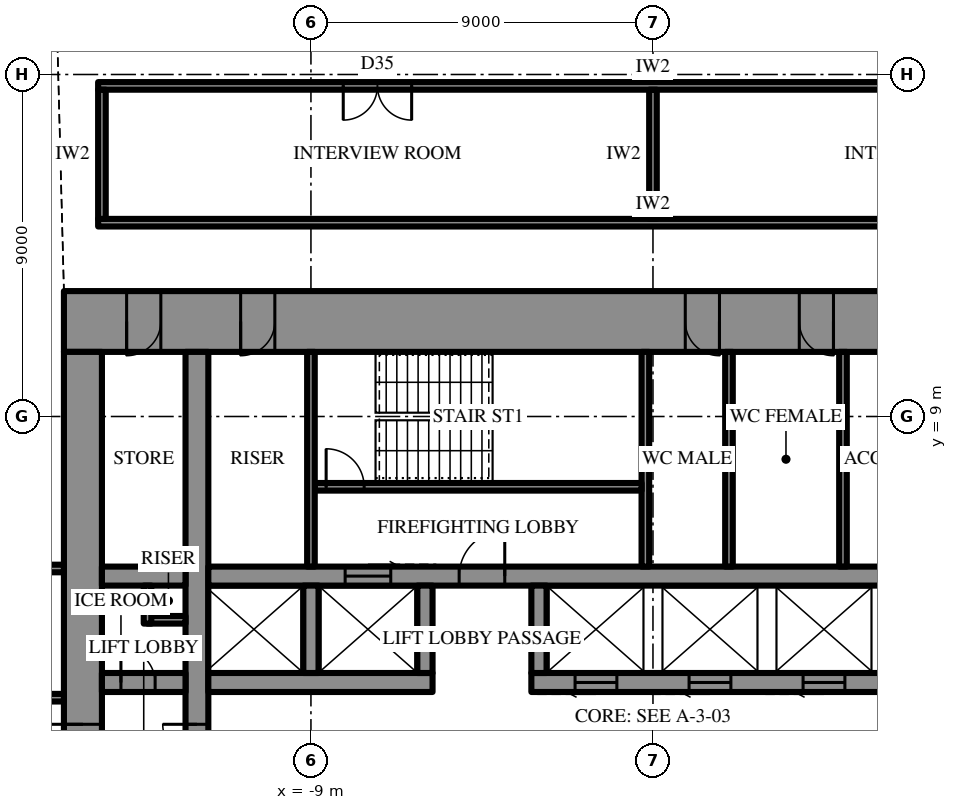
"""IFC4 building model, lengths in metres.
Left out: names, types, materials, properties, quantities, classifications, styles, units other than length and angle.
Written with IfcOpenShell. Run it as: python <this file> out.ifc"""

import sys

from ifc_helpers import new_model, si_unit, direction, frame, frame_2d, origin, place, context, subcontext, project, spatial, rectangle, extrude, element, fill, save


model = new_model("IFC4")
c1 = context("Model", 3, precision=1e-05, world=origin(), true_north=direction((0.0, 1.0)))
c2 = subcontext(c1, "Body", "Model", "MODEL_VIEW")
j1 = project(units=[si_unit("LENGTHUNIT", "METRE"), si_unit("PLANEANGLEUNIT", "RADIAN")], contexts=[c1])
p1 = place(None, origin())
s1 = spatial("IfcSite", under=j1, at=p1, CompositionType="ELEMENT")
p2 = place(p1, origin())
s2 = spatial("IfcBuilding", under=s1, at=p2, CompositionType="ELEMENT")
p3 = place(p2, frame((0.0, 0.0, 232.3)))
s3 = spatial("IfcBuildingStorey", under=s2, at=p3, CompositionType="ELEMENT", Elevation=232.3)
p4 = place(p3, frame((-15.5, 11.5, 0.0), z_axis=(0.0, 0.0, 1.0), x_axis=(1.0, 0.0, 0.0)))
e1 = element("IfcWall", 1, at=p4, inside=s3, PredefinedType="SHEAR", context=c2, shape_type="SweptSolid", body=[
    extrude(rectangle(XDim=31.0, YDim=1.6, at=frame_2d((15.5, 0.0))), origin(), (0.0, 0.0, 1.0), 4.2),
])
p5 = place(p4, frame((16.35, 0.0, 0.0)))
e2 = element("IfcOpeningElement", 2, at=p5, cuts=e1, PredefinedType="OPENING", context=c2, shape_type="SweptSolid", body=[
    extrude(rectangle(XDim=0.9, YDim=2.2, at=frame_2d((0.45, 1.1))), frame((0.0, 0.81, 0.0), z_axis=(0.0, -1.0, 0.0), x_axis=(1.0, 0.0, 0.0)), (0.0, 0.0, 1.0), 1.62),
])
p6 = place(p4, frame((19.35, 0.0, 0.0)))
e3 = element("IfcOpeningElement", 3, at=p6, cuts=e1, PredefinedType="OPENING", context=c2, shape_type="SweptSolid", body=[
    extrude(rectangle(XDim=0.9, YDim=2.2, at=frame_2d((0.45, 1.1))), frame((0.0, 0.81, 0.0), z_axis=(0.0, -1.0, 0.0), x_axis=(1.0, 0.0, 0.0)), (0.0, 0.0, 1.0), 1.62),
])
p7 = place(p4, frame((22.4, 0.0, 0.0)))
e4 = element("IfcOpeningElement", 4, at=p7, cuts=e1, PredefinedType="OPENING", context=c2, shape_type="SweptSolid", body=[
    extrude(rectangle(XDim=1.0, YDim=2.2, at=frame_2d((0.5, 1.1))), frame((0.0, 0.81, 0.0), z_axis=(0.0, -1.0, 0.0), x_axis=(1.0, 0.0, 0.0)), (0.0, 0.0, 1.0), 1.62),
])
p8 = place(p4, frame((1.65, 0.0, 0.0)))
e5 = element("IfcOpeningElement", 5, at=p8, cuts=e1, PredefinedType="OPENING", context=c2, shape_type="SweptSolid", body=[
    extrude(rectangle(XDim=0.9, YDim=2.2, at=frame_2d((0.45, 1.1))), frame((0.0, 0.81, 0.0), z_axis=(0.0, -1.0, 0.0), x_axis=(1.0, 0.0, 0.0)), (0.0, 0.0, 1.0), 1.62),
])
p9 = place(p4, frame((4.65, 0.0, 0.0)))
e6 = element("IfcOpeningElement", 6, at=p9, cuts=e1, PredefinedType="OPENING", context=c2, shape_type="SweptSolid", body=[
    extrude(rectangle(XDim=0.9, YDim=2.2, at=frame_2d((0.45, 1.1))), frame((0.0, 0.81, 0.0), z_axis=(0.0, -1.0, 0.0), x_axis=(1.0, 0.0, 0.0)), (0.0, 0.0, 1.0), 1.62),
])
p10 = place(p4, frame((25.45, 0.0, 0.0)))
e7 = element("IfcOpeningElement", 7, at=p10, cuts=e1, PredefinedType="OPENING", context=c2, shape_type="SweptSolid", body=[
    extrude(rectangle(XDim=0.9, YDim=2.2, at=frame_2d((0.45, 1.1))), frame((0.0, 0.81, 0.0), z_axis=(0.0, -1.0, 0.0), x_axis=(1.0, 0.0, 0.0)), (0.0, 0.0, 1.0), 1.62),
])
p11 = place(p4, frame((28.45, 0.0, 0.0)))
e8 = element("IfcOpeningElement", 8, at=p11, cuts=e1, PredefinedType="OPENING", context=c2, shape_type="SweptSolid", body=[
    extrude(rectangle(XDim=0.9, YDim=2.2, at=frame_2d((0.45, 1.1))), frame((0.0, 0.81, 0.0), z_axis=(0.0, -1.0, 0.0), x_axis=(1.0, 0.0, 0.0)), (0.0, 0.0, 1.0), 1.62),
])
p12 = place(p3, frame((-15.0, 10.7, 0.0), z_axis=(0.0, 0.0, 1.0), x_axis=(0.0, -1.0, 0.0)))
e9 = element("IfcWall", 9, at=p12, inside=s3, PredefinedType="SHEAR", context=c2, shape_type="SweptSolid", body=[
    extrude(rectangle(XDim=21.4, YDim=1.0, at=frame_2d((10.7, 0.0))), origin(), (0.0, 0.0, 1.0), 4.2),
])
p13 = place(p12, frame((9.8, 0.0, 0.0)))
e10 = element("IfcOpeningElement", 10, at=p13, cuts=e9, PredefinedType="OPENING", context=c2, shape_type="SweptSolid", body=[
    extrude(rectangle(XDim=1.8, YDim=2.4, at=frame_2d((0.9, 1.2))), frame((0.0, 0.51, 0.0), z_axis=(0.0, -1.0, 0.0), x_axis=(1.0, 0.0, 0.0)), (0.0, 0.0, 1.0), 1.02),
])
p14 = place(p3, frame((-12.0, -10.7, 0.0), z_axis=(0.0, 0.0, 1.0), x_axis=(0.0, 1.0, 0.0)))
e11 = element("IfcWall", 11, at=p14, inside=s3, PredefinedType="SHEAR", context=c2, shape_type="SweptSolid", body=[
    extrude(rectangle(XDim=21.4, YDim=0.6, at=frame_2d((10.7, 0.0))), origin(), (0.0, 0.0, 1.0), 4.2),
])
p15 = place(p14, frame((9.8, 0.0, 0.0)))
e12 = element("IfcOpeningElement", 12, at=p15, cuts=e11, PredefinedType="OPENING", context=c2, shape_type="SweptSolid", body=[
    extrude(rectangle(XDim=1.8, YDim=2.4, at=frame_2d((0.9, 1.2))), frame((0.0, 0.31, 0.0), z_axis=(0.0, -1.0, 0.0), x_axis=(1.0, 0.0, 0.0)), (0.0, 0.0, 1.0), 0.62),
])
p16 = place(p3, frame((-14.5, 2.0, 0.0), z_axis=(0.0, 0.0, 1.0), x_axis=(1.0, 0.0, 0.0)))
e13 = element("IfcWall", 13, at=p16, inside=s3, PredefinedType="SHEAR", context=c2, shape_type="SweptSolid", body=[
    extrude(rectangle(XDim=2.2, YDim=0.5, at=frame_2d((1.1, 0.0))), origin(), (0.0, 0.0, 1.0), 4.2),
])
p17 = place(p16, frame((0.5, 0.0, 0.0)))
e14 = element("IfcOpeningElement", 14, at=p17, cuts=e13, PredefinedType="OPENING", context=c2, shape_type="SweptSolid", body=[
    extrude(rectangle(XDim=0.9, YDim=2.2, at=frame_2d((0.45, 1.1))), frame((0.0, 0.26, 0.0), z_axis=(0.0, -1.0, 0.0), x_axis=(1.0, 0.0, 0.0)), (0.0, 0.0, 1.0), 0.52),
])
p18 = place(p3, frame((-11.7, 2.0, 0.0), z_axis=(0.0, 0.0, 1.0), x_axis=(1.0, 0.0, 0.0)))
e15 = element("IfcWall", 15, at=p18, inside=s3, PredefinedType="SHEAR", context=c2, shape_type="SweptSolid", body=[
    extrude(rectangle(XDim=5.9, YDim=0.5, at=frame_2d((2.95, 0.0))), origin(), (0.0, 0.0, 1.0), 4.2),
])
p19 = place(p3, frame((-3.2, 2.0, 0.0), z_axis=(0.0, 0.0, 1.0), x_axis=(1.0, 0.0, 0.0)))
e16 = element("IfcWall", 16, at=p19, inside=s3, PredefinedType="SHEAR", context=c2, shape_type="SweptSolid", body=[
    extrude(rectangle(XDim=14.9, YDim=0.5, at=frame_2d((7.45, 0.0))), origin(), (0.0, 0.0, 1.0), 4.2),
])
p20 = place(p19, frame((1.15, 0.0, 0.0)))
e17 = element("IfcOpeningElement", 17, at=p20, cuts=e16, PredefinedType="OPENING", context=c2, shape_type="SweptSolid", body=[
    extrude(rectangle(XDim=1.1, YDim=2.2, at=frame_2d((0.55, 1.1))), frame((0.0, 0.26, 0.0), z_axis=(0.0, -1.0, 0.0), x_axis=(1.0, 0.0, 0.0)), (0.0, 0.0, 1.0), 0.52),
])
p21 = place(p19, frame((4.15, 0.0, 0.0)))
e18 = element("IfcOpeningElement", 18, at=p21, cuts=e16, PredefinedType="OPENING", context=c2, shape_type="SweptSolid", body=[
    extrude(rectangle(XDim=1.1, YDim=2.2, at=frame_2d((0.55, 1.1))), frame((0.0, 0.26, 0.0), z_axis=(0.0, -1.0, 0.0), x_axis=(1.0, 0.0, 0.0)), (0.0, 0.0, 1.0), 0.52),
])
p22 = place(p19, frame((7.15, 0.0, 0.0)))
e19 = element("IfcOpeningElement", 19, at=p22, cuts=e16, PredefinedType="OPENING", context=c2, shape_type="SweptSolid", body=[
    extrude(rectangle(XDim=1.1, YDim=2.2, at=frame_2d((0.55, 1.1))), frame((0.0, 0.26, 0.0), z_axis=(0.0, -1.0, 0.0), x_axis=(1.0, 0.0, 0.0)), (0.0, 0.0, 1.0), 0.52),
])
p23 = place(p19, frame((10.15, 0.0, 0.0)))
e20 = element("IfcOpeningElement", 20, at=p23, cuts=e16, PredefinedType="OPENING", context=c2, shape_type="SweptSolid", body=[
    extrude(rectangle(XDim=1.1, YDim=2.2, at=frame_2d((0.55, 1.1))), frame((0.0, 0.26, 0.0), z_axis=(0.0, -1.0, 0.0), x_axis=(1.0, 0.0, 0.0)), (0.0, 0.0, 1.0), 0.52),
])
p24 = place(p3, frame((-14.5, 4.8, 0.0), z_axis=(0.0, 0.0, 1.0), x_axis=(1.0, 0.0, 0.0)))
e21 = element("IfcWall", 21, at=p24, inside=s3, PredefinedType="SHEAR", context=c2, shape_type="SweptSolid", body=[
    extrude(rectangle(XDim=2.2, YDim=0.5, at=frame_2d((1.1, 0.0))), origin(), (0.0, 0.0, 1.0), 4.2),
])
p25 = place(p3, frame((-11.7, 4.8, 0.0), z_axis=(0.0, 0.0, 1.0), x_axis=(1.0, 0.0, 0.0)))
e22 = element("IfcWall", 22, at=p25, inside=s3, PredefinedType="SHEAR", context=c2, shape_type="SweptSolid", body=[
    extrude(rectangle(XDim=23.4, YDim=0.5, at=frame_2d((11.7, 0.0))), origin(), (0.0, 0.0, 1.0), 4.2),
])
p26 = place(p25, frame((6.6, 0.0, 0.0)))
e23 = element("IfcOpeningElement", 23, at=p26, cuts=e22, PredefinedType="OPENING", context=c2, shape_type="SweptSolid", body=[
    extrude(rectangle(XDim=1.2, YDim=2.2, at=frame_2d((0.6, 1.1))), frame((0.0, 0.26, 0.0), z_axis=(0.0, -1.0, 0.0), x_axis=(1.0, 0.0, 0.0)), (0.0, 0.0, 1.0), 0.52),
])
p27 = place(p25, frame((3.6, 0.0, 0.0)))
e24 = element("IfcOpeningElement", 24, at=p27, cuts=e22, PredefinedType="OPENING", context=c2, shape_type="SweptSolid", body=[
    extrude(rectangle(XDim=1.2, YDim=2.2, at=frame_2d((0.6, 1.1))), frame((0.0, 0.26, 0.0), z_axis=(0.0, -1.0, 0.0), x_axis=(1.0, 0.0, 0.0)), (0.0, 0.0, 1.0), 0.52),
])
for number, where, z_axis, x_axis in (
    (25, (-9.0, 2.25, 0.0), (0.0, 0.0, 1.0), (0.0, 1.0, 0.0)),
    (26, (-6.0, 2.25, 0.0), (0.0, 0.0, 1.0), (0.0, 1.0, 0.0)),
    (27, (-3.0, 2.25, 0.0), (0.0, 0.0, 1.0), (0.0, 1.0, 0.0)),
):
    element("IfcWall", number, at=place(p3, frame(where, z_axis=z_axis, x_axis=x_axis)), inside=s3, PredefinedType="SHEAR", context=c2, shape_type="SweptSolid", body=[
        extrude(rectangle(XDim=2.3, YDim=0.4, at=frame_2d((1.15, 0.0))), origin(), (0.0, 0.0, 1.0), 4.2),
    ])
p28 = place(p3, frame((-0.2, 5.05, 0.0), z_axis=(0.0, 0.0, 1.0), x_axis=(0.0, 1.0, 0.0)))
e28 = element("IfcWall", 28, at=p28, inside=s3, PredefinedType="SHEAR", context=c2, shape_type="SweptSolid", body=[
    extrude(rectangle(XDim=5.65, YDim=0.2, at=frame_2d((2.825, 0.0))), origin(), (0.0, 0.0, 1.0), 4.2),
])
p29 = place(p3, frame((-8.9, 7.15, 0.0), z_axis=(0.0, 0.0, 1.0), x_axis=(1.0, 0.0, 0.0)))
e29 = element("IfcWall", 29, at=p29, inside=s3, PredefinedType="SHEAR", context=c2, shape_type="SweptSolid", body=[
    extrude(rectangle(XDim=8.6, YDim=0.2, at=frame_2d((4.3, 0.0))), origin(), (0.0, 0.0, 1.0), 4.2),
])
p30 = place(p29, frame((0.3, 0.0, 0.0)))
e30 = element("IfcOpeningElement", 30, at=p30, cuts=e29, PredefinedType="OPENING", context=c2, shape_type="SweptSolid", body=[
    extrude(rectangle(XDim=1.0, YDim=2.2, at=frame_2d((0.5, 1.1))), frame((0.0, 0.11, 0.0), z_axis=(0.0, -1.0, 0.0), x_axis=(1.0, 0.0, 0.0)), (0.0, 0.0, 1.0), 0.22),
])
for number, where, z_axis, x_axis in (
    (31, (-9.0, 5.05, 0.0), (0.0, 0.0, 1.0), (0.0, 1.0, 0.0)),
    (32, (2.0, 5.05, 0.0), (0.0, 0.0, 1.0), (0.0, 1.0, 0.0)),
    (33, (5.0, 5.05, 0.0), (0.0, 0.0, 1.0), (0.0, 1.0, 0.0)),
):
    element("IfcWall", number, at=place(p3, frame(where, z_axis=z_axis, x_axis=x_axis)), inside=s3, PredefinedType="PARTITIONING", context=c2, shape_type="SweptSolid", body=[
        extrude(rectangle(XDim=5.65, YDim=0.2, at=frame_2d((2.825, 0.0))), origin(), (0.0, 0.0, 1.0), 4.0),
    ])
for number, where, z_axis, x_axis in (
    (34, (-13.3, 3.65, 0.0), (0.0, 0.0, 1.0), (1.0, 0.0, 0.0)),
    (35, (-13.3, 3.55, 0.0), (0.0, 0.0, 1.0), (0.0, 1.0, 0.0)),
):
    element("IfcWall", number, at=place(p3, frame(where, z_axis=z_axis, x_axis=x_axis)), inside=s3, PredefinedType="PARTITIONING", context=c2, shape_type="SweptSolid", body=[
        extrude(rectangle(XDim=1.0, YDim=0.2, at=frame_2d((0.5, 0.0))), origin(), (0.0, 0.0, 1.0), 4.0),
    ])
p31 = place(p3, frame((-14.6, 14.1, 0.0), z_axis=(0.0, 0.0, 1.0), x_axis=(1.0, 0.0, 0.0)))
e36 = element("IfcWall", 36, at=p31, inside=s3, PredefinedType="PARTITIONING", context=c2, shape_type="SweptSolid", body=[
    extrude(rectangle(XDim=29.2, YDim=0.2, at=frame_2d((14.6, 0.0))), origin(), (0.0, 0.0, 1.0), 4.0),
])
p32 = place(p3, frame((-14.6, 17.7, 0.0), z_axis=(0.0, 0.0, 1.0), x_axis=(1.0, 0.0, 0.0)))
e37 = element("IfcWall", 37, at=p32, inside=s3, PredefinedType="PARTITIONING", context=c2, shape_type="SweptSolid", body=[
    extrude(rectangle(XDim=29.2, YDim=0.2, at=frame_2d((14.6, 0.0))), origin(), (0.0, 0.0, 1.0), 4.0),
])
p33 = place(p32, frame((6.45, 0.0, 0.0)))
e38 = element("IfcOpeningElement", 38, at=p33, cuts=e37, PredefinedType="OPENING", context=c2, shape_type="SweptSolid", body=[
    extrude(rectangle(XDim=1.8, YDim=2.4, at=frame_2d((0.9, 1.2))), frame((0.0, 0.11, 0.0), z_axis=(0.0, -1.0, 0.0), x_axis=(1.0, 0.0, 0.0)), (0.0, 0.0, 1.0), 0.22),
])
p34 = place(p32, frame((20.95, 0.0, 0.0)))
e39 = element("IfcOpeningElement", 39, at=p34, cuts=e37, PredefinedType="OPENING", context=c2, shape_type="SweptSolid", body=[
    extrude(rectangle(XDim=1.8, YDim=2.4, at=frame_2d((0.9, 1.2))), frame((0.0, 0.11, 0.0), z_axis=(0.0, -1.0, 0.0), x_axis=(1.0, 0.0, 0.0)), (0.0, 0.0, 1.0), 0.22),
])
p35 = place(p3, frame((-14.5, 14.2, 0.0), z_axis=(0.0, 0.0, 1.0), x_axis=(0.0, 1.0, 0.0)))
e40 = element("IfcWall", 40, at=p35, inside=s3, PredefinedType="PARTITIONING", context=c2, shape_type="SweptSolid", body=[
    extrude(rectangle(XDim=3.4, YDim=0.2, at=frame_2d((1.7, 0.0))), origin(), (0.0, 0.0, 1.0), 4.0),
])
p36 = place(p3, frame((0.0, 14.2, 0.0), z_axis=(0.0, 0.0, 1.0), x_axis=(0.0, 1.0, 0.0)))
e41 = element("IfcWall", 41, at=p36, inside=s3, PredefinedType="PARTITIONING", context=c2, shape_type="SweptSolid", body=[
    extrude(rectangle(XDim=3.4, YDim=0.2, at=frame_2d((1.7, 0.0))), origin(), (0.0, 0.0, 1.0), 2.992),
])
p37 = place(p3, frame((-15.5, 1.6, 0.0), z_axis=(0.0, 0.0, 1.0), x_axis=(-1.0, 0.0, 0.0)))
e42 = element("IfcWall", 42, at=p37, inside=s3, PredefinedType="PARTITIONING", context=c2, shape_type="SweptSolid", body=[
    extrude(rectangle(XDim=9.7, YDim=0.2, at=frame_2d((4.85, 0.0))), origin(), (0.0, 0.0, 1.0), 4.0),
])
p38 = place(p37, frame((6.29, 0.0, 0.0)))
e43 = element("IfcOpeningElement", 43, at=p38, cuts=e42, PredefinedType="OPENING", context=c2, shape_type="SweptSolid", body=[
    extrude(rectangle(XDim=1.0, YDim=2.2, at=frame_2d((0.5, 1.1))), frame((0.0, 0.11, 0.0), z_axis=(0.0, -1.0, 0.0), x_axis=(1.0, 0.0, 0.0)), (0.0, 0.0, 1.0), 0.22),
])
p39 = place(p3, frame((-15.5, 5.0, 0.0), z_axis=(0.0, 0.0, 1.0), x_axis=(-1.0, 0.0, 0.0)))
e44 = element("IfcWall", 44, at=p39, inside=s3, PredefinedType="PARTITIONING", context=c2, shape_type="SweptSolid", body=[
    extrude(rectangle(XDim=14.845, YDim=0.2, at=frame_2d((7.423, 0.0))), origin(), (0.0, 0.0, 1.0), 4.0),
])
p40 = place(p13, frame((1.8, 0.0, 0.0), z_axis=(0.0, 0.0, 1.0), x_axis=(-1.0, 0.0, 0.0)))
e45 = element("IfcDoor", 45, at=p40, inside=s3, OperationType="DOUBLE_DOOR_SINGLE_SWING", PredefinedType="DOOR", context=c2, shape_type="SweptSolid", body=[
    extrude(rectangle(XDim=1.8, YDim=2.4, at=frame_2d((0.9, 1.2))), frame((0.0, 0.025, 0.0), z_axis=(0.0, -1.0, 0.0), x_axis=(1.0, 0.0, 0.0)), (0.0, 0.0, 1.0), 0.05),
])
fill(e10, e45)
p41 = place(p26, origin())
e46 = element("IfcDoor", 46, at=p41, inside=s3, OperationType="SINGLE_SWING_LEFT", PredefinedType="DOOR", context=c2, shape_type="SweptSolid", body=[
    extrude(rectangle(XDim=1.2, YDim=2.2, at=frame_2d((0.6, 1.1))), frame((0.0, 0.025, 0.0), z_axis=(0.0, -1.0, 0.0), x_axis=(1.0, 0.0, 0.0)), (0.0, 0.0, 1.0), 0.05),
])
fill(e23, e46)
p42 = place(p30, origin())
e47 = element("IfcDoor", 47, at=p42, inside=s3, OperationType="SINGLE_SWING_RIGHT", PredefinedType="DOOR", context=c2, shape_type="SweptSolid", body=[
    extrude(rectangle(XDim=1.0, YDim=2.2, at=frame_2d((0.5, 1.1))), frame((0.0, 0.025, 0.0), z_axis=(0.0, -1.0, 0.0), x_axis=(1.0, 0.0, 0.0)), (0.0, 0.0, 1.0), 0.05),
])
fill(e30, e47)
p43 = place(p5, frame((0.9, 0.0, 0.0), z_axis=(0.0, 0.0, 1.0), x_axis=(-1.0, 0.0, 0.0)))
e48 = element("IfcDoor", 48, at=p43, inside=s3, OperationType="SINGLE_SWING_RIGHT", PredefinedType="DOOR", context=c2, shape_type="SweptSolid", body=[
    extrude(rectangle(XDim=0.9, YDim=2.2, at=frame_2d((0.45, 1.1))), frame((0.0, 0.025, 0.0), z_axis=(0.0, -1.0, 0.0), x_axis=(1.0, 0.0, 0.0)), (0.0, 0.0, 1.0), 0.05),
])
fill(e2, e48)
p44 = place(p6, frame((0.9, 0.0, 0.0), z_axis=(0.0, 0.0, 1.0), x_axis=(-1.0, 0.0, 0.0)))
e49 = element("IfcDoor", 49, at=p44, inside=s3, OperationType="SINGLE_SWING_RIGHT", PredefinedType="DOOR", context=c2, shape_type="SweptSolid", body=[
    extrude(rectangle(XDim=0.9, YDim=2.2, at=frame_2d((0.45, 1.1))), frame((0.0, 0.025, 0.0), z_axis=(0.0, -1.0, 0.0), x_axis=(1.0, 0.0, 0.0)), (0.0, 0.0, 1.0), 0.05),
])
fill(e3, e49)
p45 = place(p8, frame((0.9, 0.0, 0.0), z_axis=(0.0, 0.0, 1.0), x_axis=(-1.0, 0.0, 0.0)))
e50 = element("IfcDoor", 50, at=p45, inside=s3, OperationType="SINGLE_SWING_LEFT", PredefinedType="DOOR", context=c2, shape_type="SweptSolid", body=[
    extrude(rectangle(XDim=0.9, YDim=2.2, at=frame_2d((0.45, 1.1))), frame((0.0, 0.025, 0.0), z_axis=(0.0, -1.0, 0.0), x_axis=(1.0, 0.0, 0.0)), (0.0, 0.0, 1.0), 0.05),
])
fill(e5, e50)
p46 = place(p9, frame((0.9, 0.0, 0.0), z_axis=(0.0, 0.0, 1.0), x_axis=(-1.0, 0.0, 0.0)))
e51 = element("IfcDoor", 51, at=p46, inside=s3, OperationType="SINGLE_SWING_LEFT", PredefinedType="DOOR", context=c2, shape_type="SweptSolid", body=[
    extrude(rectangle(XDim=0.9, YDim=2.2, at=frame_2d((0.45, 1.1))), frame((0.0, 0.025, 0.0), z_axis=(0.0, -1.0, 0.0), x_axis=(1.0, 0.0, 0.0)), (0.0, 0.0, 1.0), 0.05),
])
fill(e6, e51)
p47 = place(p17, origin())
e52 = element("IfcDoor", 52, at=p47, inside=s3, OperationType="SINGLE_SWING_RIGHT", PredefinedType="DOOR", context=c2, shape_type="SweptSolid", body=[
    extrude(rectangle(XDim=0.9, YDim=2.2, at=frame_2d((0.45, 1.1))), frame((0.0, 0.025, 0.0), z_axis=(0.0, -1.0, 0.0), x_axis=(1.0, 0.0, 0.0)), (0.0, 0.0, 1.0), 0.05),
])
fill(e14, e52)
p48 = place(p15, origin())
e53 = element("IfcDoor", 53, at=p48, inside=s3, OperationType="DOUBLE_DOOR_SINGLE_SWING", PredefinedType="DOOR", context=c2, shape_type="SweptSolid", body=[
    extrude(rectangle(XDim=1.8, YDim=2.4, at=frame_2d((0.9, 1.2))), frame((0.0, 0.025, 0.0), z_axis=(0.0, -1.0, 0.0), x_axis=(1.0, 0.0, 0.0)), (0.0, 0.0, 1.0), 0.05),
])
fill(e12, e53)
p49 = place(p27, origin())
e54 = element("IfcDoor", 54, at=p49, inside=s3, OperationType="SLIDING_TO_LEFT", PredefinedType="DOOR", context=c2, shape_type="SweptSolid", body=[
    extrude(rectangle(XDim=1.2, YDim=2.2, at=frame_2d((0.6, 1.1))), frame((0.0, 0.025, 0.0), z_axis=(0.0, -1.0, 0.0), x_axis=(1.0, 0.0, 0.0)), (0.0, 0.0, 1.0), 0.05),
])
fill(e24, e54)
p50 = place(p20, frame((1.1, 0.0, 0.0), z_axis=(0.0, 0.0, 1.0), x_axis=(-1.0, 0.0, 0.0)))
e55 = element("IfcDoor", 55, at=p50, inside=s3, OperationType="SLIDING_TO_LEFT", PredefinedType="DOOR", context=c2, shape_type="SweptSolid", body=[
    extrude(rectangle(XDim=1.1, YDim=2.2, at=frame_2d((0.55, 1.1))), frame((0.0, 0.025, 0.0), z_axis=(0.0, -1.0, 0.0), x_axis=(1.0, 0.0, 0.0)), (0.0, 0.0, 1.0), 0.05),
])
fill(e17, e55)
p51 = place(p21, frame((1.1, 0.0, 0.0), z_axis=(0.0, 0.0, 1.0), x_axis=(-1.0, 0.0, 0.0)))
e56 = element("IfcDoor", 56, at=p51, inside=s3, OperationType="SLIDING_TO_LEFT", PredefinedType="DOOR", context=c2, shape_type="SweptSolid", body=[
    extrude(rectangle(XDim=1.1, YDim=2.2, at=frame_2d((0.55, 1.1))), frame((0.0, 0.025, 0.0), z_axis=(0.0, -1.0, 0.0), x_axis=(1.0, 0.0, 0.0)), (0.0, 0.0, 1.0), 0.05),
])
fill(e18, e56)
p52 = place(p22, frame((1.1, 0.0, 0.0), z_axis=(0.0, 0.0, 1.0), x_axis=(-1.0, 0.0, 0.0)))
e57 = element("IfcDoor", 57, at=p52, inside=s3, OperationType="SLIDING_TO_LEFT", PredefinedType="DOOR", context=c2, shape_type="SweptSolid", body=[
    extrude(rectangle(XDim=1.1, YDim=2.2, at=frame_2d((0.55, 1.1))), frame((0.0, 0.025, 0.0), z_axis=(0.0, -1.0, 0.0), x_axis=(1.0, 0.0, 0.0)), (0.0, 0.0, 1.0), 0.05),
])
fill(e19, e57)
p53 = place(p33, frame((1.8, 0.0, 0.0), z_axis=(0.0, 0.0, 1.0), x_axis=(-1.0, 0.0, 0.0)))
e58 = element("IfcDoor", 58, at=p53, inside=s3, OperationType="DOUBLE_DOOR_SINGLE_SWING", PredefinedType="DOOR", context=c2, shape_type="SweptSolid", body=[
    extrude(rectangle(XDim=1.8, YDim=2.4, at=frame_2d((0.9, 1.2))), frame((0.0, 0.025, 0.0), z_axis=(0.0, -1.0, 0.0), x_axis=(1.0, 0.0, 0.0)), (0.0, 0.0, 1.0), 0.05),
])
fill(e38, e58)
save(model, sys.argv[1])
